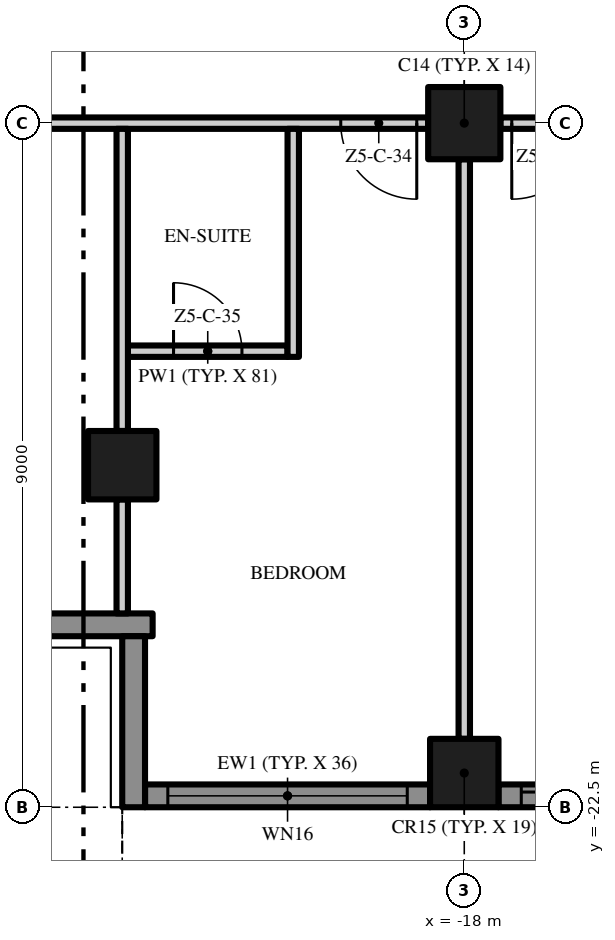
"""IFC4 building model, lengths in metres.
Left out: names, types, materials, properties, quantities, classifications, styles, units other than length and angle.
Written with IfcOpenShell. Run it as: python <this file> out.ifc"""

import sys

from ifc_helpers import new_model, si_unit, direction, frame, frame_2d, origin, origin_2d, place, context, subcontext, project, spatial, polyline, rectangle, outline, extrude, element, fill, save


model = new_model("IFC4")
c1 = context("Model", 3, precision=1e-05, world=origin(), true_north=direction((0.0, 1.0)))
c2 = subcontext(c1, "Body", "Model", "MODEL_VIEW")
j1 = project(units=[si_unit("LENGTHUNIT", "METRE"), si_unit("PLANEANGLEUNIT", "RADIAN")], contexts=[c1])
p1 = place(None, origin())
s1 = spatial("IfcSite", under=j1, at=p1, CompositionType="ELEMENT")
p2 = place(p1, origin())
s2 = spatial("IfcBuilding", under=s1, at=p2, CompositionType="ELEMENT")
p3 = place(p2, frame((0.0, 0.0, 269.2)))
s3 = spatial("IfcBuildingStorey", under=s2, at=p3, CompositionType="ELEMENT", Elevation=269.2)
p4 = place(p3, frame((-18.0, -13.5, 0.0), z_axis=(0.0, 0.0, 1.0), x_axis=(1.0, 0.0, 0.0)))
e1 = element("IfcColumn", 1, at=p4, inside=s3, PredefinedType="COLUMN", context=c2, shape_type="SweptSolid", body=[
    extrude(rectangle(XDim=0.95, YDim=0.95, at=origin_2d()), origin(), (0.0, 0.0, 1.0), 3.5),
])
for number, where, z_axis, x_axis in (
    (2, (-18.0, -22.05, 0.0), (0.0, 0.0, 1.0), (1.0, 0.0, 0.0)),
    (3, (-22.5, -18.0, 0.0), (0.0, 0.0, 1.0), (1.0, 0.0, 0.0)),
):
    element("IfcColumn", number, at=place(p3, frame(where, z_axis=z_axis, x_axis=x_axis)), inside=s3, PredefinedType="COLUMN", context=c2, shape_type="SweptSolid", body=[
        extrude(rectangle(XDim=0.9, YDim=0.9, at=origin_2d()), origin(), (0.0, 0.0, 1.0), 3.5),
    ])
p5 = place(p3, frame((-18.45, -22.35, 0.0), z_axis=(0.0, 0.0, 1.0), x_axis=(-1.0, 0.0, 0.0)))
e4 = element("IfcWall", 4, at=p5, inside=s3, PredefinedType="SOLIDWALL", context=c2, shape_type="SweptSolid", body=[
    extrude(rectangle(XDim=3.75, YDim=0.3, at=frame_2d((1.875, 0.0))), origin(), (0.0, 0.0, 1.0), 3.5),
])
p6 = place(p5, frame((0.3, 0.0, 0.45)))
e5 = element("IfcOpeningElement", 5, at=p6, cuts=e4, PredefinedType="OPENING", context=c2, shape_type="SweptSolid", body=[
    extrude(rectangle(XDim=3.15, YDim=2.65, at=frame_2d((1.575, 1.325))), frame((0.0, 0.16, 0.0), z_axis=(0.0, -1.0, 0.0), x_axis=(1.0, 0.0, 0.0)), (0.0, 0.0, 1.0), 0.32),
])
p7 = place(p3, frame((-9.45, -22.35, 0.0), z_axis=(0.0, 0.0, 1.0), x_axis=(-1.0, 0.0, 0.0)))
e6 = element("IfcWall", 6, at=p7, inside=s3, PredefinedType="SOLIDWALL", context=c2, shape_type="SweptSolid", body=[
    extrude(rectangle(XDim=8.1, YDim=0.3, at=frame_2d((4.05, 0.0))), origin(), (0.0, 0.0, 1.0), 3.5),
])
p8 = place(p7, frame((4.6, 0.0, 0.0)))
e7 = element("IfcOpeningElement", 7, at=p8, cuts=e6, PredefinedType="OPENING", context=c2, shape_type="SweptSolid", body=[
    extrude(rectangle(XDim=3.2, YDim=2.4, at=frame_2d((1.6, 1.2))), frame((0.0, 0.16, 0.0), z_axis=(0.0, -1.0, 0.0), x_axis=(1.0, 0.0, 0.0)), (0.0, 0.0, 1.0), 0.32),
])
p9 = place(p7, frame((0.3, 0.0, 0.45)))
e8 = element("IfcOpeningElement", 8, at=p9, cuts=e6, PredefinedType="OPENING", context=c2, shape_type="SweptSolid", body=[
    extrude(rectangle(XDim=3.2, YDim=2.65, at=frame_2d((1.6, 1.325))), frame((0.0, 0.16, 0.0), z_axis=(0.0, -1.0, 0.0), x_axis=(1.0, 0.0, 0.0)), (0.0, 0.0, 1.0), 0.32),
])
p10 = place(p3, frame((-22.1, -20.1, 0.0), z_axis=(0.0, 0.0, 1.0), x_axis=(-1.0, 0.0, 0.0)))
e9 = element("IfcWall", 9, at=p10, inside=s3, PredefinedType="SOLIDWALL", context=c2, shape_type="SweptSolid", body=[
    extrude(rectangle(XDim=2.35, YDim=0.3, at=frame_2d((1.175, 0.0))), origin(), (0.0, 0.0, 1.0), 3.5),
])
p11 = place(p3, frame((-22.35, -22.5, 0.0), z_axis=(0.0, 0.0, 1.0), x_axis=(0.0, 1.0, 0.0)))
e10 = element("IfcWall", 10, at=p11, inside=s3, PredefinedType="SOLIDWALL", context=c2, shape_type="SweptSolid", body=[
    extrude(rectangle(XDim=2.25, YDim=0.3, at=frame_2d((1.125, 0.0))), origin(), (0.0, 0.0, 1.0), 3.5),
])
p12 = place(p3, origin())
e11 = element("IfcWall", 11, at=p12, inside=s3, PredefinedType="USERDEFINED", context=c2, shape_type="SweptSolid", body=[
    extrude(outline(polyline([(-22.5, -23.451), (-21.0, -24.112), (-19.5, -24.845), (-18.0, -25.369), (-16.875, -25.5), (-16.5, -25.485), (-15.0, -25.149), (-13.5, -24.488), (-12.0, -23.755), (-10.5, -23.231), (-9.375, -23.1), (-9.0, -23.115), (-7.5, -23.451), (-6.0, -24.112), (-4.5, -24.845), (-3.0, -25.369), (-1.875, -25.5), (-1.5, -25.485), (0.0, -25.149), (1.5, -24.488), (3.0, -23.755), (4.5, -23.231), (5.625, -23.1), (6.0, -23.115), (7.5, -23.451), (9.0, -24.112), (10.5, -24.845), (12.0, -25.369), (13.125, -25.5), (13.5, -25.485), (15.0, -25.149), (16.5, -24.488), (18.0, -23.755), (19.5, -23.231), (20.625, -23.1), (21.0, -23.115), (22.5, -23.451), (22.555, -23.208), (21.033, -22.866), (20.615, -22.849), (19.444, -22.986), (17.904, -23.524), (16.395, -24.261), (14.921, -24.91), (13.467, -25.236), (13.135, -25.249), (12.056, -25.124), (10.596, -24.614), (9.105, -23.885), (7.579, -23.213), (6.033, -22.866), (5.615, -22.849), (4.444, -22.986), (2.904, -23.524), (1.395, -24.261), (-0.079, -24.91), (-1.533, -25.236), (-1.865, -25.249), (-2.944, -25.124), (-4.404, -24.614), (-5.895, -23.885), (-7.421, -23.213), (-8.967, -22.866), (-9.385, -22.849), (-10.556, -22.986), (-12.096, -23.524), (-13.605, -24.261), (-15.079, -24.91), (-16.533, -25.236), (-16.865, -25.249), (-17.944, -25.124), (-19.404, -24.614), (-20.895, -23.885), (-22.399, -23.223), (-22.5, -23.451)])), origin(), (0.0, 0.0, 1.0), 0.9),
])
p13 = place(p3, frame((-22.425, -16.5, 0.0), z_axis=(0.0, 0.0, 1.0), x_axis=(1.0, 0.0, 0.0)))
e12 = element("IfcWall", 12, at=p13, inside=s3, PredefinedType="PARTITIONING", context=c2, shape_type="SweptSolid", body=[
    extrude(rectangle(XDim=2.1, YDim=0.15, at=frame_2d((1.05, 0.0))), origin(), (0.0, 0.0, 1.0), 3.5),
])
p14 = place(p13, frame((0.6, 0.0, 0.0)))
e13 = element("IfcOpeningElement", 13, at=p14, cuts=e12, PredefinedType="OPENING", context=c2, shape_type="SweptSolid", body=[
    extrude(rectangle(XDim=0.9, YDim=2.1, at=frame_2d((0.45, 1.05))), frame((0.0, 0.085, 0.0), z_axis=(0.0, -1.0, 0.0), x_axis=(1.0, 0.0, 0.0)), (0.0, 0.0, 1.0), 0.17),
])
p15 = place(p3, frame((-18.475, -13.5, 0.0), z_axis=(0.0, 0.0, 1.0), x_axis=(-1.0, 0.0, 0.0)))
e14 = element("IfcWall", 14, at=p15, inside=s3, PredefinedType="PARTITIONING", context=c2, shape_type="SweptSolid", body=[
    extrude(rectangle(XDim=7.625, YDim=0.15, at=frame_2d((3.812, 0.0))), origin(), (0.0, 0.0, 1.0), 3.5),
])
p16 = place(p15, frame((0.15, 0.0, 0.0)))
e15 = element("IfcOpeningElement", 15, at=p16, cuts=e14, PredefinedType="OPENING", context=c2, shape_type="SweptSolid", body=[
    extrude(rectangle(XDim=1.0, YDim=2.4, at=frame_2d((0.5, 1.2))), frame((0.0, 0.085, 0.0), z_axis=(0.0, -1.0, 0.0), x_axis=(1.0, 0.0, 0.0)), (0.0, 0.0, 1.0), 0.17),
])
p17 = place(p15, frame((5.775, 0.0, 0.0)))
e16 = element("IfcOpeningElement", 16, at=p17, cuts=e14, PredefinedType="OPENING", context=c2, shape_type="SweptSolid", body=[
    extrude(rectangle(XDim=1.0, YDim=2.4, at=frame_2d((0.5, 1.2))), frame((0.0, 0.085, 0.0), z_axis=(0.0, -1.0, 0.0), x_axis=(1.0, 0.0, 0.0)), (0.0, 0.0, 1.0), 0.17),
])
p18 = place(p3, frame((-9.475, -13.5, 0.0), z_axis=(0.0, 0.0, 1.0), x_axis=(-1.0, 0.0, 0.0)))
e17 = element("IfcWall", 17, at=p18, inside=s3, PredefinedType="PARTITIONING", context=c2, shape_type="SweptSolid", body=[
    extrude(rectangle(XDim=8.05, YDim=0.15, at=frame_2d((4.025, 0.0))), origin(), (0.0, 0.0, 1.0), 3.5),
])
p19 = place(p18, frame((0.15, 0.0, 0.0)))
e18 = element("IfcOpeningElement", 18, at=p19, cuts=e17, PredefinedType="OPENING", context=c2, shape_type="SweptSolid", body=[
    extrude(rectangle(XDim=1.0, YDim=2.4, at=frame_2d((0.5, 1.2))), frame((0.0, 0.085, 0.0), z_axis=(0.0, -1.0, 0.0), x_axis=(1.0, 0.0, 0.0)), (0.0, 0.0, 1.0), 0.17),
])
p20 = place(p18, frame((6.9, 0.0, 0.0)))
e19 = element("IfcOpeningElement", 19, at=p20, cuts=e17, PredefinedType="OPENING", context=c2, shape_type="SweptSolid", body=[
    extrude(rectangle(XDim=1.0, YDim=2.4, at=frame_2d((0.5, 1.2))), frame((0.0, 0.085, 0.0), z_axis=(0.0, -1.0, 0.0), x_axis=(1.0, 0.0, 0.0)), (0.0, 0.0, 1.0), 0.17),
])
p21 = place(p3, frame((-22.5, -19.95, 0.0), z_axis=(0.0, 0.0, 1.0), x_axis=(0.0, 1.0, 0.0)))
e20 = element("IfcWall", 20, at=p21, inside=s3, PredefinedType="PARTITIONING", context=c2, shape_type="SweptSolid", body=[
    extrude(rectangle(XDim=1.5, YDim=0.15, at=frame_2d((0.75, 0.0))), origin(), (0.0, 0.0, 1.0), 3.5),
])
p22 = place(p3, frame((-22.5, -17.55, 0.0), z_axis=(0.0, 0.0, 1.0), x_axis=(0.0, 1.0, 0.0)))
e21 = element("IfcWall", 21, at=p22, inside=s3, PredefinedType="PARTITIONING", context=c2, shape_type="SweptSolid", body=[
    extrude(rectangle(XDim=3.975, YDim=0.15, at=frame_2d((1.988, 0.0))), origin(), (0.0, 0.0, 1.0), 3.5),
])
p23 = place(p3, frame((-20.25, -16.575, 0.0), z_axis=(0.0, 0.0, 1.0), x_axis=(0.0, 1.0, 0.0)))
e22 = element("IfcWall", 22, at=p23, inside=s3, PredefinedType="PARTITIONING", context=c2, shape_type="SweptSolid", body=[
    extrude(rectangle(XDim=3.0, YDim=0.15, at=frame_2d((1.5, 0.0))), origin(), (0.0, 0.0, 1.0), 3.5),
])
p24 = place(p3, frame((-18.0, -21.6, 0.0), z_axis=(0.0, 0.0, 1.0), x_axis=(0.0, 1.0, 0.0)))
e23 = element("IfcWall", 23, at=p24, inside=s3, PredefinedType="PARTITIONING", context=c2, shape_type="SweptSolid", body=[
    extrude(rectangle(XDim=7.625, YDim=0.15, at=frame_2d((3.812, 0.0))), origin(), (0.0, 0.0, 1.0), 3.5),
])
p25 = place(p6, origin())
e24 = element("IfcWindow", 24, at=p25, inside=s3, PartitioningType="SINGLE_PANEL", PredefinedType="WINDOW", context=c2, shape_type="SweptSolid", body=[
    extrude(rectangle(XDim=3.15, YDim=2.65, at=frame_2d((1.575, 1.325))), frame((0.0, 0.03, 0.0), z_axis=(0.0, -1.0, 0.0), x_axis=(1.0, 0.0, 0.0)), (0.0, 0.0, 1.0), 0.06),
])
fill(e5, e24)
p26 = place(p8, origin())
e25 = element("IfcDoor", 25, at=p26, inside=s3, OperationType="SINGLE_SWING_LEFT", PredefinedType="DOOR", context=c2, shape_type="SweptSolid", body=[
    extrude(rectangle(XDim=3.2, YDim=2.4, at=frame_2d((1.6, 1.2))), frame((0.0, 0.025, 0.0), z_axis=(0.0, -1.0, 0.0), x_axis=(1.0, 0.0, 0.0)), (0.0, 0.0, 1.0), 0.05),
])
fill(e7, e25)
p27 = place(p20, origin())
e26 = element("IfcDoor", 26, at=p27, inside=s3, OperationType="SINGLE_SWING_RIGHT", PredefinedType="DOOR", context=c2, shape_type="SweptSolid", body=[
    extrude(rectangle(XDim=1.0, YDim=2.4, at=frame_2d((0.5, 1.2))), frame((0.0, 0.025, 0.0), z_axis=(0.0, -1.0, 0.0), x_axis=(1.0, 0.0, 0.0)), (0.0, 0.0, 1.0), 0.05),
])
fill(e19, e26)
p28 = place(p16, origin())
e27 = element("IfcDoor", 27, at=p28, inside=s3, OperationType="SINGLE_SWING_LEFT", PredefinedType="DOOR", context=c2, shape_type="SweptSolid", body=[
    extrude(rectangle(XDim=1.0, YDim=2.4, at=frame_2d((0.5, 1.2))), frame((0.0, 0.025, 0.0), z_axis=(0.0, -1.0, 0.0), x_axis=(1.0, 0.0, 0.0)), (0.0, 0.0, 1.0), 0.05),
])
fill(e15, e27)
p29 = place(p14, origin())
e28 = element("IfcDoor", 28, at=p29, inside=s3, OperationType="SINGLE_SWING_LEFT", PredefinedType="DOOR", context=c2, shape_type="SweptSolid", body=[
    extrude(rectangle(XDim=0.9, YDim=2.1, at=frame_2d((0.45, 1.05))), frame((0.0, 0.025, 0.0), z_axis=(0.0, -1.0, 0.0), x_axis=(1.0, 0.0, 0.0)), (0.0, 0.0, 1.0), 0.05),
])
fill(e13, e28)
save(model, sys.argv[1])
